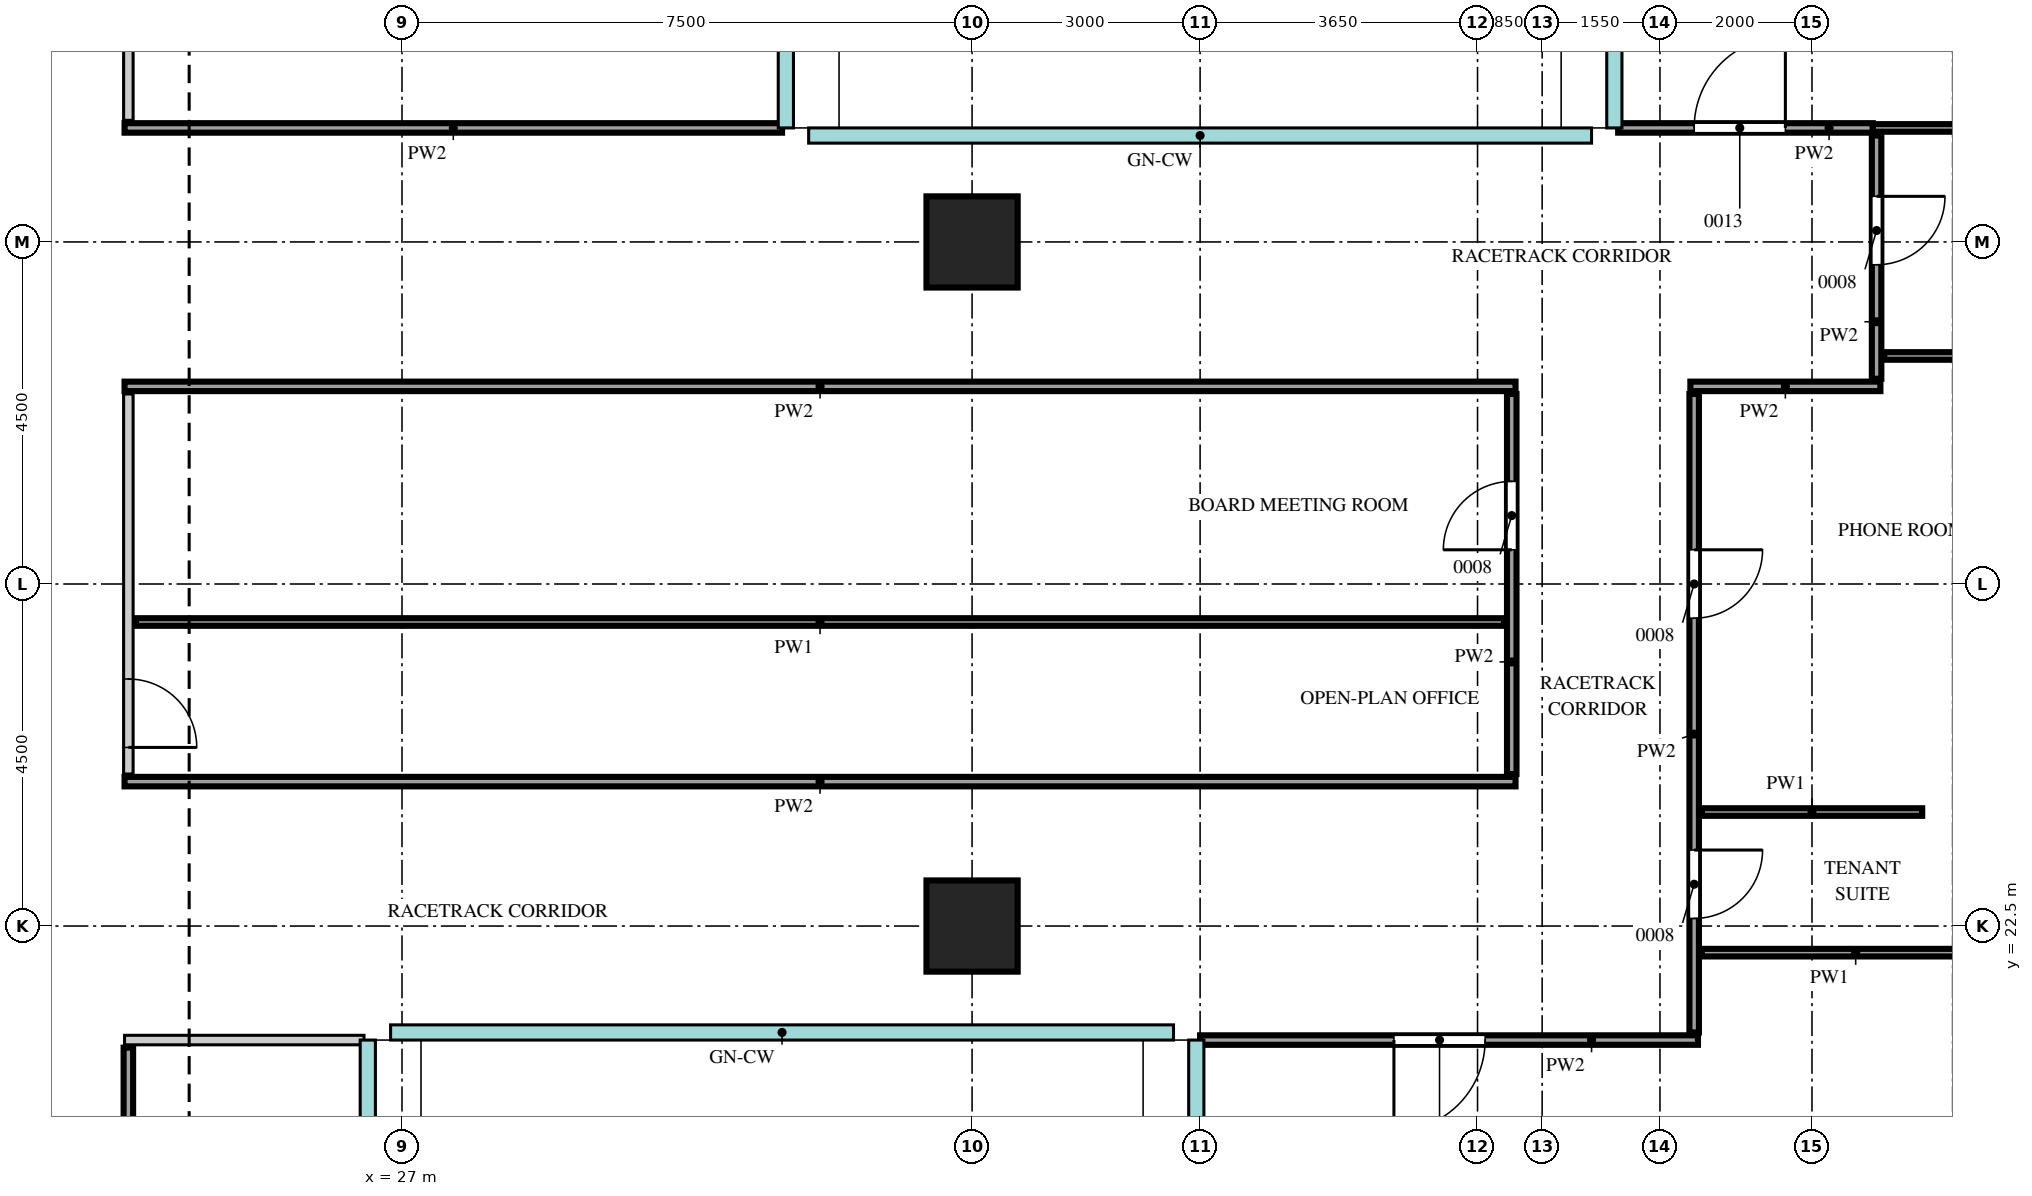
"""IFC4 building model, lengths in metres.
Left out: names, types, materials, properties, quantities, classifications, styles, units other than length and angle.
Written with IfcOpenShell. Run it as: python <this file> out.ifc"""

import sys

from ifc_helpers import new_model, si_unit, direction, frame, frame_2d, origin, origin_2d, place, context, subcontext, project, spatial, rectangle, extrude, source, transform, mapped, element, fill, save


model = new_model("IFC4")
c1 = context("Model", 3, precision=1e-05, world=origin(), true_north=direction((0.0, 1.0)))
c2 = subcontext(c1, "Body", "Model", "MODEL_VIEW")
j1 = project(units=[si_unit("LENGTHUNIT", "METRE"), si_unit("PLANEANGLEUNIT", "RADIAN")], contexts=[c1])
p1 = place(None, origin())
s1 = spatial("IfcSite", under=j1, at=p1, CompositionType="ELEMENT")
p2 = place(p1, origin())
s2 = spatial("IfcBuilding", under=s1, at=p2, CompositionType="ELEMENT")
p3 = place(p2, frame((0.0, 0.0, 172.7)))
s3 = spatial("IfcBuildingStorey", under=s2, at=p3, CompositionType="ELEMENT", Elevation=172.7)
m1 = source(origin(), c2, "Body", "SweptSolid", [
    extrude(rectangle(XDim=1.2, YDim=1.2, at=origin_2d()), origin(), (0.0, 0.0, 1.0), 3.75),
])
for number, where, z_axis, x_axis in (
    (1, (34.5, 22.5, 0.0), (0.0, 0.0, 1.0), (1.0, 0.0, 0.0)),
    (2, (34.5, 31.5, 0.0), (0.0, 0.0, 1.0), (1.0, 0.0, 0.0)),
):
    element("IfcColumn", number, at=place(p3, frame(where, z_axis=z_axis, x_axis=x_axis)), inside=s3, PredefinedType="COLUMN", context=c2, shape_type="MappedRepresentation", body=[
        mapped(m1, transform((0.0, 0.0, 0.0))),
    ])
m2 = source(origin(), c2, "Body", "SweptSolid", [
    extrude(rectangle(XDim=14.75, YDim=0.125, at=frame_2d((7.375, 0.0))), origin(), (0.0, 0.0, 1.0), 3.8),
])
p4 = place(p3, frame((23.4, 6.15, 0.0), z_axis=(0.0, 0.0, 1.0), x_axis=(0.0, 1.0, 0.0)))
e3 = element("IfcWall", 3, at=p4, inside=s3, PredefinedType="PARTITIONING", context=c2, shape_type="MappedRepresentation", body=[
    mapped(m2, transform((0.0, 0.0, 0.0))),
])
m3 = source(origin(), c2, "Body", "SweptSolid", [
    extrude(rectangle(XDim=0.9, YDim=2.1, at=frame_2d((0.45, 1.05))), frame((0.0, 0.073, 0.0), z_axis=(0.0, -1.0, 0.0), x_axis=(1.0, 0.0, 0.0)), (0.0, 0.0, 1.0), 0.145),
])
p5 = place(p4, frame((7.95, 0.0, 0.0)))
e4 = element("IfcOpeningElement", 4, at=p5, cuts=e3, PredefinedType="OPENING", context=c2, shape_type="MappedRepresentation", body=[
    mapped(m3, transform((0.0, 0.0, 0.0))),
])
m4 = source(origin(), c2, "Body", "SweptSolid", [
    extrude(rectangle(XDim=3.15, YDim=0.125, at=frame_2d((1.575, 0.0))), origin(), (0.0, 0.0, 1.0), 3.8),
])
p6 = place(p3, frame((23.35, 21.0, 0.0), z_axis=(0.0, 0.0, 1.0), x_axis=(1.0, 0.0, 0.0)))
e5 = element("IfcWall", 5, at=p6, inside=s3, PredefinedType="PARTITIONING", context=c2, shape_type="MappedRepresentation", body=[
    mapped(m4, transform((0.0, 0.0, 0.0))),
])
m5 = source(origin(), c2, "Body", "SweptSolid", [
    extrude(rectangle(XDim=6.55, YDim=0.125, at=frame_2d((3.275, 0.0))), origin(), (0.0, 0.0, 1.0), 3.8),
])
p7 = place(p3, frame((37.5, 21.0, 0.0), z_axis=(0.0, 0.0, 1.0), x_axis=(1.0, 0.0, 0.0)))
e6 = element("IfcWall", 6, at=p7, inside=s3, PredefinedType="PARTITIONING", context=c2, shape_type="MappedRepresentation", body=[
    mapped(m5, transform((0.0, 0.0, 0.0))),
])
m6 = source(origin(), c2, "Body", "SweptSolid", [
    extrude(rectangle(XDim=1.2, YDim=2.1, at=frame_2d((0.6, 1.05))), frame((0.0, 0.073, 0.0), z_axis=(0.0, -1.0, 0.0), x_axis=(1.0, 0.0, 0.0)), (0.0, 0.0, 1.0), 0.145),
])
p8 = place(p7, frame((2.55, 0.0, 0.0)))
e7 = element("IfcOpeningElement", 7, at=p8, cuts=e6, PredefinedType="OPENING", context=c2, shape_type="MappedRepresentation", body=[
    mapped(m6, transform((0.0, 0.0, 0.0))),
])
m7 = source(origin(), c2, "Body", "SweptSolid", [
    extrude(rectangle(XDim=8.4, YDim=0.125, at=frame_2d((4.2, 0.0))), origin(), (0.0, 0.0, 1.0), 3.8),
])
p9 = place(p3, frame((44.0, 21.1, 0.0), z_axis=(0.0, 0.0, 1.0), x_axis=(0.0, 1.0, 0.0)))
e8 = element("IfcWall", 8, at=p9, inside=s3, PredefinedType="PARTITIONING", context=c2, shape_type="MappedRepresentation", body=[
    mapped(m7, transform((0.0, 0.0, 0.0))),
])
p10 = place(p9, frame((1.5, 0.0, 0.0)))
e9 = element("IfcOpeningElement", 9, at=p10, cuts=e8, PredefinedType="OPENING", context=c2, shape_type="MappedRepresentation", body=[
    mapped(m3, transform((0.0, 0.0, 0.0))),
])
p11 = place(p9, frame((5.45, 0.0, 0.0)))
e10 = element("IfcOpeningElement", 10, at=p11, cuts=e8, PredefinedType="OPENING", context=c2, shape_type="MappedRepresentation", body=[
    mapped(m3, transform((0.0, 0.0, 0.0))),
])
m8 = source(origin(), c2, "Body", "SweptSolid", [
    extrude(rectangle(XDim=4.05, YDim=0.1, at=frame_2d((2.025, 0.0))), origin(), (0.0, 0.0, 1.0), 3.8),
])
p12 = place(p3, frame((44.1, 22.15, 0.0), z_axis=(0.0, 0.0, 1.0), x_axis=(1.0, 0.0, 0.0)))
e11 = element("IfcWall", 11, at=p12, inside=s3, PredefinedType="PARTITIONING", context=c2, shape_type="MappedRepresentation", body=[
    mapped(m8, transform((0.0, 0.0, 0.0))),
])
m9 = source(origin(), c2, "Body", "SweptSolid", [
    extrude(rectangle(XDim=2.9, YDim=0.1, at=frame_2d((1.45, 0.0))), origin(), (0.0, 0.0, 1.0), 3.8),
])
p13 = place(p3, frame((44.1, 24.0, 0.0), z_axis=(0.0, 0.0, 1.0), x_axis=(1.0, 0.0, 0.0)))
e12 = element("IfcWall", 12, at=p13, inside=s3, PredefinedType="PARTITIONING", context=c2, shape_type="MappedRepresentation", body=[
    mapped(m9, transform((0.0, 0.0, 0.0))),
])
m10 = source(origin(), c2, "Body", "SweptSolid", [
    extrude(rectangle(XDim=18.3, YDim=0.125, at=frame_2d((9.15, 0.0))), origin(), (0.0, 0.0, 1.0), 3.8),
])
p14 = place(p3, frame((23.35, 24.4, 0.0), z_axis=(0.0, 0.0, 1.0), x_axis=(1.0, 0.0, 0.0)))
e13 = element("IfcWall", 13, at=p14, inside=s3, PredefinedType="PARTITIONING", context=c2, shape_type="MappedRepresentation", body=[
    mapped(m10, transform((0.0, 0.0, 0.0))),
])
m11 = source(origin(), c2, "Body", "SweptSolid", [
    extrude(rectangle(XDim=5.0, YDim=0.125, at=frame_2d((2.5, 0.0))), origin(), (0.0, 0.0, 1.0), 3.8),
])
p15 = place(p3, frame((23.4, 24.5, 0.0), z_axis=(0.0, 0.0, 1.0), x_axis=(0.0, 1.0, 0.0)))
e14 = element("IfcWall", 14, at=p15, inside=s3, PredefinedType="PARTITIONING", context=c2, shape_type="MappedRepresentation", body=[
    mapped(m11, transform((0.0, 0.0, 0.0))),
])
p16 = place(p15, frame((0.35, 0.0, 0.0)))
e15 = element("IfcOpeningElement", 15, at=p16, cuts=e14, PredefinedType="OPENING", context=c2, shape_type="MappedRepresentation", body=[
    mapped(m3, transform((0.0, 0.0, 0.0))),
])
p17 = place(p3, frame((41.6, 24.5, 0.0), z_axis=(0.0, 0.0, 1.0), x_axis=(0.0, 1.0, 0.0)))
e16 = element("IfcWall", 16, at=p17, inside=s3, PredefinedType="PARTITIONING", context=c2, shape_type="MappedRepresentation", body=[
    mapped(m11, transform((0.0, 0.0, 0.0))),
])
p18 = place(p17, frame((2.95, 0.0, 0.0)))
e17 = element("IfcOpeningElement", 17, at=p18, cuts=e16, PredefinedType="OPENING", context=c2, shape_type="MappedRepresentation", body=[
    mapped(m3, transform((0.0, 0.0, 0.0))),
])
m12 = source(origin(), c2, "Body", "SweptSolid", [
    extrude(rectangle(XDim=18.0, YDim=0.1, at=frame_2d((9.0, 0.0))), origin(), (0.0, 0.0, 1.0), 3.8),
])
p19 = place(p3, frame((23.5, 26.5, 0.0), z_axis=(0.0, 0.0, 1.0), x_axis=(1.0, 0.0, 0.0)))
e18 = element("IfcWall", 18, at=p19, inside=s3, PredefinedType="PARTITIONING", context=c2, shape_type="MappedRepresentation", body=[
    mapped(m12, transform((0.0, 0.0, 0.0))),
])
p20 = place(p3, frame((23.35, 29.6, 0.0), z_axis=(0.0, 0.0, 1.0), x_axis=(1.0, 0.0, 0.0)))
e19 = element("IfcWall", 19, at=p20, inside=s3, PredefinedType="PARTITIONING", context=c2, shape_type="MappedRepresentation", body=[
    mapped(m10, transform((0.0, 0.0, 0.0))),
])
m13 = source(origin(), c2, "Body", "SweptSolid", [
    extrude(rectangle(XDim=2.5, YDim=0.125, at=frame_2d((1.25, 0.0))), origin(), (0.0, 0.0, 1.0), 3.8),
])
p21 = place(p3, frame((43.95, 29.6, 0.0), z_axis=(0.0, 0.0, 1.0), x_axis=(1.0, 0.0, 0.0)))
e20 = element("IfcWall", 20, at=p21, inside=s3, PredefinedType="PARTITIONING", context=c2, shape_type="MappedRepresentation", body=[
    mapped(m13, transform((0.0, 0.0, 0.0))),
])
m14 = source(origin(), c2, "Body", "SweptSolid", [
    extrude(rectangle(XDim=3.2, YDim=0.125, at=frame_2d((1.6, 0.0))), origin(), (0.0, 0.0, 1.0), 3.8),
])
p22 = place(p3, frame((46.4, 29.7, 0.0), z_axis=(0.0, 0.0, 1.0), x_axis=(0.0, 1.0, 0.0)))
e21 = element("IfcWall", 21, at=p22, inside=s3, PredefinedType="PARTITIONING", context=c2, shape_type="MappedRepresentation", body=[
    mapped(m14, transform((0.0, 0.0, 0.0))),
])
p23 = place(p22, frame((1.5, 0.0, 0.0)))
e22 = element("IfcOpeningElement", 22, at=p23, cuts=e21, PredefinedType="OPENING", context=c2, shape_type="MappedRepresentation", body=[
    mapped(m3, transform((0.0, 0.0, 0.0))),
])
m15 = source(origin(), c2, "Body", "SweptSolid", [
    extrude(rectangle(XDim=4.35, YDim=0.1, at=frame_2d((2.175, 0.0))), origin(), (0.0, 0.0, 1.0), 3.8),
])
p24 = place(p3, frame((46.5, 30.0, 0.0), z_axis=(0.0, 0.0, 1.0), x_axis=(1.0, 0.0, 0.0)))
e23 = element("IfcWall", 23, at=p24, inside=s3, PredefinedType="PARTITIONING", context=c2, shape_type="MappedRepresentation", body=[
    mapped(m15, transform((0.0, 0.0, 0.0))),
])
m16 = source(origin(), c2, "Body", "SweptSolid", [
    extrude(rectangle(XDim=8.65, YDim=0.125, at=frame_2d((4.325, 0.0))), origin(), (0.0, 0.0, 1.0), 3.8),
])
p25 = place(p3, frame((23.35, 33.0, 0.0), z_axis=(0.0, 0.0, 1.0), x_axis=(1.0, 0.0, 0.0)))
e24 = element("IfcWall", 24, at=p25, inside=s3, PredefinedType="PARTITIONING", context=c2, shape_type="MappedRepresentation", body=[
    mapped(m16, transform((0.0, 0.0, 0.0))),
])
m17 = source(origin(), c2, "Body", "SweptSolid", [
    extrude(rectangle(XDim=3.35, YDim=0.125, at=frame_2d((1.675, 0.0))), origin(), (0.0, 0.0, 1.0), 3.8),
])
p26 = place(p3, frame((43.0, 33.0, 0.0), z_axis=(0.0, 0.0, 1.0), x_axis=(1.0, 0.0, 0.0)))
e25 = element("IfcWall", 25, at=p26, inside=s3, PredefinedType="PARTITIONING", context=c2, shape_type="MappedRepresentation", body=[
    mapped(m17, transform((0.0, 0.0, 0.0))),
])
p27 = place(p26, frame((1.0, 0.0, 0.0)))
e26 = element("IfcOpeningElement", 26, at=p27, cuts=e25, PredefinedType="OPENING", context=c2, shape_type="MappedRepresentation", body=[
    mapped(m6, transform((0.0, 0.0, 0.0))),
])
m18 = source(origin(), c2, "Body", "SweptSolid", [
    extrude(rectangle(XDim=4.5, YDim=0.1, at=frame_2d((2.25, 0.0))), origin(), (0.0, 0.0, 1.0), 3.8),
])
p28 = place(p3, frame((46.35, 33.0, 0.0), z_axis=(0.0, 0.0, 1.0), x_axis=(1.0, 0.0, 0.0)))
e27 = element("IfcWall", 27, at=p28, inside=s3, PredefinedType="PARTITIONING", context=c2, shape_type="MappedRepresentation", body=[
    mapped(m18, transform((0.0, 0.0, 0.0))),
])
m19 = source(origin(), c2, "Body", "SweptSolid", [
    extrude(rectangle(XDim=6.3, YDim=0.125, at=frame_2d((3.15, 0.0))), origin(), (0.0, 0.0, 1.0), 3.8),
])
p29 = place(p3, frame((23.4, 33.1, 0.0), z_axis=(0.0, 0.0, 1.0), x_axis=(0.0, 1.0, 0.0)))
e28 = element("IfcWall", 28, at=p29, inside=s3, PredefinedType="PARTITIONING", context=c2, shape_type="MappedRepresentation", body=[
    mapped(m19, transform((0.0, 0.0, 0.0))),
])
m20 = source(origin(), c2, "Body", "SweptSolid", [
    extrude(rectangle(XDim=1.2, YDim=2.1, at=frame_2d((0.6, 1.05))), frame((0.0, 0.025, 0.0), z_axis=(0.0, -1.0, 0.0), x_axis=(1.0, 0.0, 0.0)), (0.0, 0.0, 1.0), 0.05),
])
p30 = place(p8, origin())
e29 = element("IfcDoor", 29, at=p30, inside=s3, OperationType="SINGLE_SWING_LEFT", PredefinedType="DOOR", context=c2, shape_type="MappedRepresentation", body=[
    mapped(m20, transform((0.0, 0.0, 0.0))),
])
fill(e7, e29)
p31 = place(p27, origin())
e30 = element("IfcDoor", 30, at=p31, inside=s3, OperationType="SINGLE_SWING_LEFT", PredefinedType="DOOR", context=c2, shape_type="MappedRepresentation", body=[
    mapped(m20, transform((0.0, 0.0, 0.0))),
])
fill(e26, e30)
m21 = source(origin(), c2, "Body", "SweptSolid", [
    extrude(rectangle(XDim=0.9, YDim=2.1, at=frame_2d((0.45, 1.05))), frame((0.0, 0.025, 0.0), z_axis=(0.0, -1.0, 0.0), x_axis=(1.0, 0.0, 0.0)), (0.0, 0.0, 1.0), 0.05),
])
p32 = place(p10, origin())
e31 = element("IfcDoor", 31, at=p32, inside=s3, OperationType="SINGLE_SWING_RIGHT", PredefinedType="DOOR", context=c2, shape_type="MappedRepresentation", body=[
    mapped(m21, transform((0.0, 0.0, 0.0))),
])
fill(e9, e31)
p33 = place(p11, origin())
e32 = element("IfcDoor", 32, at=p33, inside=s3, OperationType="SINGLE_SWING_RIGHT", PredefinedType="DOOR", context=c2, shape_type="MappedRepresentation", body=[
    mapped(m21, transform((0.0, 0.0, 0.0))),
])
fill(e10, e32)
p34 = place(p23, origin())
e33 = element("IfcDoor", 33, at=p34, inside=s3, OperationType="SINGLE_SWING_RIGHT", PredefinedType="DOOR", context=c2, shape_type="MappedRepresentation", body=[
    mapped(m21, transform((0.0, 0.0, 0.0))),
])
fill(e22, e33)
p35 = place(p16, origin())
e34 = element("IfcDoor", 34, at=p35, inside=s3, OperationType="SINGLE_SWING_LEFT", PredefinedType="DOOR", context=c2, shape_type="MappedRepresentation", body=[
    mapped(m21, transform((0.0, 0.0, 0.0))),
])
fill(e15, e34)
p36 = place(p18, origin())
e35 = element("IfcDoor", 35, at=p36, inside=s3, OperationType="SINGLE_SWING_RIGHT", PredefinedType="DOOR", context=c2, shape_type="MappedRepresentation", body=[
    mapped(m21, transform((0.0, 0.0, 0.0))),
])
fill(e17, e35)
save(model, sys.argv[1])
